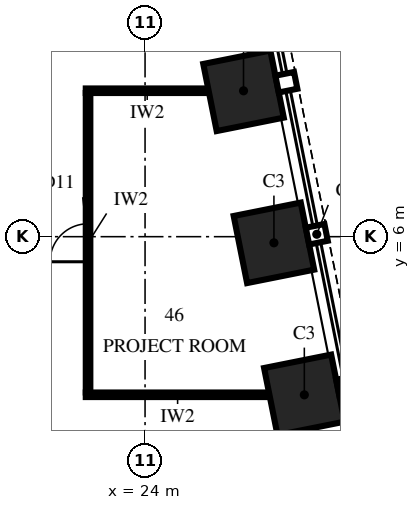
"""IFC4 building model, lengths in metres.
Left out: names, types, materials, properties, quantities, classifications, styles, units other than length and angle.
Written with IfcOpenShell. Run it as: python <this file> out.ifc"""

import sys

from ifc_helpers import new_model, si_unit, direction, frame, frame_2d, origin, origin_2d, place, context, subcontext, project, spatial, rectangle, extrude, element, fill, save


model = new_model("IFC4")
c1 = context("Model", 3, precision=1e-05, world=origin(), true_north=direction((0.0, 1.0)))
c2 = subcontext(c1, "Body", "Model", "MODEL_VIEW")
j1 = project(units=[si_unit("LENGTHUNIT", "METRE"), si_unit("PLANEANGLEUNIT", "RADIAN")], contexts=[c1])
p1 = place(None, origin())
s1 = spatial("IfcSite", under=j1, at=p1, CompositionType="ELEMENT")
p2 = place(p1, origin())
s2 = spatial("IfcBuilding", under=s1, at=p2, CompositionType="ELEMENT")
p3 = place(p2, frame((0.0, 0.0, 139.0)))
s3 = spatial("IfcBuildingStorey", under=s2, at=p3, CompositionType="ELEMENT", Elevation=139.0)
for number, where, z_axis, x_axis in (
    (1, (28.191, 1.838, 0.0), (0.0, 0.0, 1.0), (-0.196, 0.981, 0.0)),
    (2, (27.391, 5.838, 0.0), (0.0, 0.0, 1.0), (-0.196, 0.981, 0.0)),
    (3, (26.591, 9.838, 0.0), (0.0, 0.0, 1.0), (-0.196, 0.981, 0.0)),
):
    element("IfcColumn", number, at=place(p3, frame(where, z_axis=z_axis, x_axis=x_axis)), inside=s3, PredefinedType="COLUMN", context=c2, shape_type="SweptSolid", body=[
        extrude(rectangle(XDim=1.8, YDim=1.8, at=origin_2d()), origin(), (0.0, 0.0, 1.0), 4.0),
    ])
p4 = place(p3, frame((22.44, 1.84, 0.0), z_axis=(0.0, 0.0, 1.0), x_axis=(1.0, 0.0, 0.0)))
e4 = element("IfcWall", 4, at=p4, inside=s3, PredefinedType="PARTITIONING", context=c2, shape_type="SweptSolid", body=[
    extrude(rectangle(XDim=4.833, YDim=0.12, at=frame_2d((2.417, 0.0))), origin(), (0.0, 0.0, 1.0), 3.25),
])
p5 = place(p3, frame((22.44, 9.84, 0.0), z_axis=(0.0, 0.0, 1.0), x_axis=(1.0, 0.0, 0.0)))
e5 = element("IfcWall", 5, at=p5, inside=s3, PredefinedType="PARTITIONING", context=c2, shape_type="SweptSolid", body=[
    extrude(rectangle(XDim=3.233, YDim=0.12, at=frame_2d((1.616, 0.0))), origin(), (0.0, 0.0, 1.0), 3.25),
])
p6 = place(p3, frame((22.5, 1.9, 0.0), z_axis=(0.0, 0.0, 1.0), x_axis=(0.0, 1.0, 0.0)))
e6 = element("IfcWall", 6, at=p6, inside=s3, PredefinedType="PARTITIONING", context=c2, shape_type="SweptSolid", body=[
    extrude(rectangle(XDim=7.88, YDim=0.12, at=frame_2d((3.94, 0.0))), origin(), (0.0, 0.0, 1.0), 2.842),
])
p7 = place(p6, frame((3.44, 0.0, 0.0)))
e7 = element("IfcOpeningElement", 7, at=p7, cuts=e6, PredefinedType="OPENING", context=c2, shape_type="SweptSolid", body=[
    extrude(rectangle(XDim=1.0, YDim=2.4, at=frame_2d((0.5, 1.2))), frame((0.0, 0.075, 0.0), z_axis=(0.0, -1.0, 0.0), x_axis=(1.0, 0.0, 0.0)), (0.0, 0.0, 1.0), 0.15),
])
p8 = place(p7, origin())
e8 = element("IfcDoor", 8, at=p8, inside=s3, OperationType="SINGLE_SWING_RIGHT", PredefinedType="DOOR", context=c2, shape_type="SweptSolid", body=[
    extrude(rectangle(XDim=1.0, YDim=2.4, at=frame_2d((0.5, 1.2))), frame((0.0, 0.06, 0.0), z_axis=(0.0, -1.0, 0.0), x_axis=(1.0, 0.0, 0.0)), (0.0, 0.0, 1.0), 0.12),
])
fill(e7, e8)
save(model, sys.argv[1])
